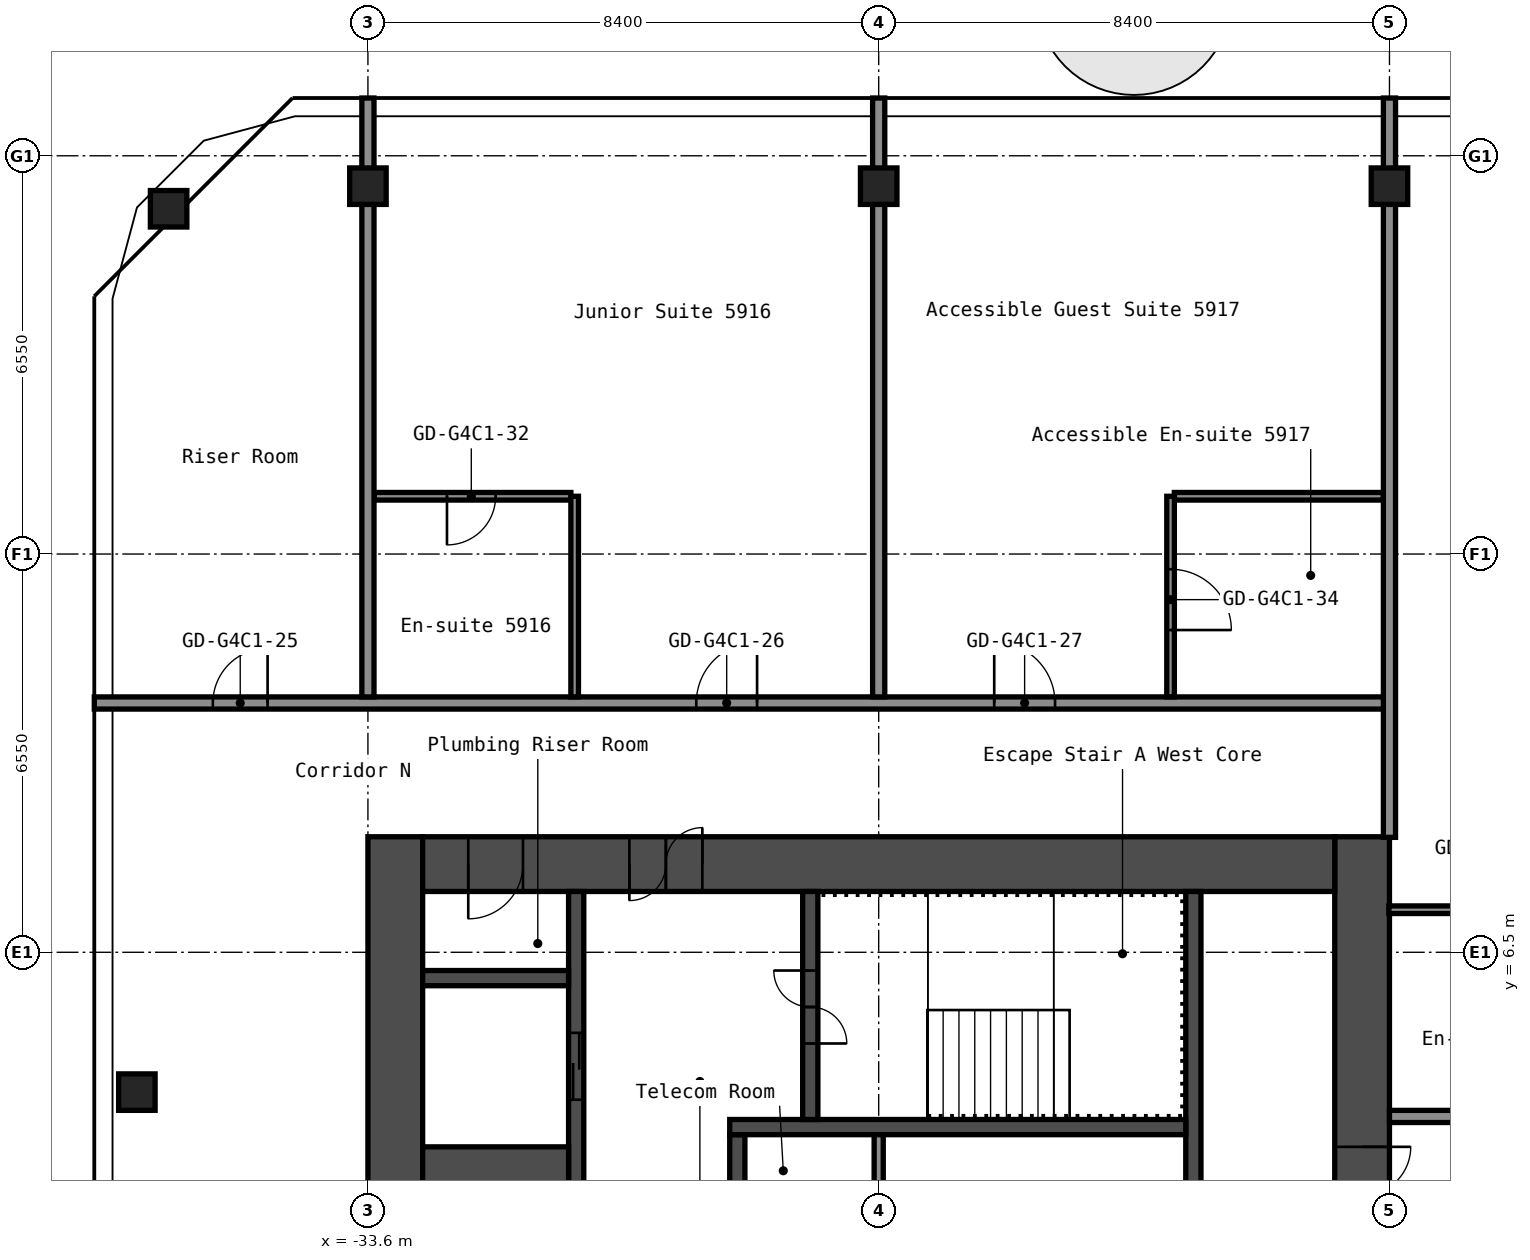
"""IFC4 building model, lengths in metres.
Left out: names, types, materials, properties, quantities, classifications, styles, units other than length and angle.
Written with IfcOpenShell. Run it as: python <this file> out.ifc"""

import sys

from ifc_helpers import new_model, si_unit, direction, frame, frame_2d, origin, origin_2d, place, context, subcontext, project, spatial, rectangle, hollow_rectangle, extrude, element, fill, save


model = new_model("IFC4")
c1 = context("Model", 3, precision=1e-05, world=origin(), true_north=direction((0.0, 1.0)))
c2 = subcontext(c1, "Body", "Model", "MODEL_VIEW")
j1 = project(units=[si_unit("LENGTHUNIT", "METRE"), si_unit("PLANEANGLEUNIT", "RADIAN")], contexts=[c1])
p1 = place(None, origin())
s1 = spatial("IfcSite", under=j1, at=p1, CompositionType="ELEMENT")
p2 = place(p1, origin())
s2 = spatial("IfcBuilding", under=s1, at=p2, CompositionType="ELEMENT")
p3 = place(p2, frame((0.0, 0.0, 209.0)))
s3 = spatial("IfcBuildingStorey", under=s2, at=p3, CompositionType="ELEMENT", Elevation=209.0)
for number, where, z_axis, x_axis in (
    (1, (-37.4, 4.2, 0.0), (0.0, 0.0, 1.0), (1.0, 0.0, 0.0)),
    (2, (-36.878, 18.729, 0.0), (0.0, 0.0, 1.0), (1.0, 0.0, 0.0)),
    (3, (-33.6, 19.1, 0.0), (0.0, 0.0, 1.0), (1.0, 0.0, 0.0)),
    (4, (-25.2, 19.1, 0.0), (0.0, 0.0, 1.0), (1.0, 0.0, 0.0)),
    (5, (-16.8, 19.1, 0.0), (0.0, 0.0, 1.0), (1.0, 0.0, 0.0)),
):
    element("IfcColumn", number, at=place(p3, frame(where, z_axis=z_axis, x_axis=x_axis)), inside=s3, PredefinedType="COLUMN", context=c2, shape_type="SweptSolid", body=[
        extrude(hollow_rectangle(XDim=0.6, YDim=0.6, WallThickness=0.025, InnerFilletRadius=0.038, OuterFilletRadius=0.062, at=origin_2d()), origin(), (0.0, 0.0, 1.0), 2.75),
    ])
p4 = place(p3, frame((-17.25, -8.4, 0.0), z_axis=(0.0, 0.0, 1.0), x_axis=(0.0, 1.0, 0.0)))
e6 = element("IfcWall", 6, at=p4, inside=s3, PredefinedType="SHEAR", context=c2, shape_type="SweptSolid", body=[
    extrude(rectangle(XDim=16.8, YDim=0.9, at=frame_2d((8.4, 0.0))), origin(), (0.0, 0.0, 1.0), 2.75),
])
p5 = place(p4, frame((10.1, 0.0, 0.0)))
e7 = element("IfcOpeningElement", 7, at=p5, cuts=e6, PredefinedType="OPENING", context=c2, shape_type="SweptSolid", body=[
    extrude(rectangle(XDim=1.6, YDim=2.1, at=frame_2d((0.8, 1.05))), frame((0.0, 0.46, 0.0), z_axis=(0.0, -1.0, 0.0), x_axis=(1.0, 0.0, 0.0)), (0.0, 0.0, 1.0), 0.92),
])
p6 = place(p3, frame((-33.15, -8.4, 0.0), z_axis=(0.0, 0.0, 1.0), x_axis=(0.0, 1.0, 0.0)))
e8 = element("IfcWall", 8, at=p6, inside=s3, PredefinedType="SHEAR", context=c2, shape_type="SweptSolid", body=[
    extrude(rectangle(XDim=16.8, YDim=0.9, at=frame_2d((8.4, 0.0))), origin(), (0.0, 0.0, 1.0), 2.75),
])
p7 = place(p3, frame((-32.7, 7.95, 0.0), z_axis=(0.0, 0.0, 1.0), x_axis=(1.0, 0.0, 0.0)))
e9 = element("IfcWall", 9, at=p7, inside=s3, PredefinedType="SHEAR", context=c2, shape_type="SweptSolid", body=[
    extrude(rectangle(XDim=15.0, YDim=0.9, at=frame_2d((7.5, 0.0))), origin(), (0.0, 0.0, 1.0), 2.75),
])
p8 = place(p7, frame((3.4, 0.0, 0.0)))
e10 = element("IfcOpeningElement", 10, at=p8, cuts=e9, PredefinedType="OPENING", context=c2, shape_type="SweptSolid", body=[
    extrude(rectangle(XDim=1.2, YDim=2.1, at=frame_2d((0.6, 1.05))), frame((0.0, 0.46, 0.0), z_axis=(0.0, -1.0, 0.0), x_axis=(1.0, 0.0, 0.0)), (0.0, 0.0, 1.0), 0.92),
])
p9 = place(p7, frame((0.75, 0.0, 0.0)))
e11 = element("IfcOpeningElement", 11, at=p9, cuts=e9, PredefinedType="OPENING", context=c2, shape_type="SweptSolid", body=[
    extrude(rectangle(XDim=0.9, YDim=2.1, at=frame_2d((0.45, 1.05))), frame((0.0, 0.46, 0.0), z_axis=(0.0, -1.0, 0.0), x_axis=(1.0, 0.0, 0.0)), (0.0, 0.0, 1.0), 0.92),
])
p10 = place(p3, frame((-20.025, 1.2, 0.0), z_axis=(0.0, 0.0, 1.0), x_axis=(0.0, 1.0, 0.0)))
e12 = element("IfcWall", 12, at=p10, inside=s3, PredefinedType="SHEAR", context=c2, shape_type="SweptSolid", body=[
    extrude(rectangle(XDim=6.3, YDim=0.25, at=frame_2d((3.15, 0.0))), origin(), (0.0, 0.0, 1.0), 2.75),
])
p11 = place(p3, frame((-27.525, 1.45, 0.0), z_axis=(0.0, 0.0, 1.0), x_axis=(0.0, 1.0, 0.0)))
e13 = element("IfcWall", 13, at=p11, inside=s3, PredefinedType="SHEAR", context=c2, shape_type="SweptSolid", body=[
    extrude(rectangle(XDim=2.05, YDim=0.25, at=frame_2d((1.025, 0.0))), origin(), (0.0, 0.0, 1.0), 2.75),
])
p12 = place(p3, frame((-27.65, 3.625, 0.0), z_axis=(0.0, 0.0, 1.0), x_axis=(1.0, 0.0, 0.0)))
e14 = element("IfcWall", 14, at=p12, inside=s3, PredefinedType="SHEAR", context=c2, shape_type="SweptSolid", body=[
    extrude(rectangle(XDim=7.5, YDim=0.25, at=frame_2d((3.75, 0.0))), origin(), (0.0, 0.0, 1.0), 2.75),
])
p13 = place(p3, frame((-26.325, 3.75, 0.0), z_axis=(0.0, 0.0, 1.0), x_axis=(0.0, 1.0, 0.0)))
e15 = element("IfcWall", 15, at=p13, inside=s3, PredefinedType="SHEAR", context=c2, shape_type="SweptSolid", body=[
    extrude(rectangle(XDim=3.75, YDim=0.25, at=frame_2d((1.875, 0.0))), origin(), (0.0, 0.0, 1.0), 2.75),
])
p14 = place(p13, frame((1.25, 0.0, 0.0)))
e16 = element("IfcOpeningElement", 16, at=p14, cuts=e15, PredefinedType="OPENING", context=c2, shape_type="SweptSolid", body=[
    extrude(rectangle(XDim=1.2, YDim=2.1, at=frame_2d((0.6, 1.05))), frame((0.0, 0.135, 0.0), z_axis=(0.0, -1.0, 0.0), x_axis=(1.0, 0.0, 0.0)), (0.0, 0.0, 1.0), 0.27),
])
p15 = place(p3, frame((-30.175, 1.45, 0.0), z_axis=(0.0, 0.0, 1.0), x_axis=(0.0, 1.0, 0.0)))
e17 = element("IfcWall", 17, at=p15, inside=s3, PredefinedType="SHEAR", context=c2, shape_type="SweptSolid", body=[
    extrude(rectangle(XDim=6.05, YDim=0.25, at=frame_2d((3.025, 0.0))), origin(), (0.0, 0.0, 1.0), 2.75),
])
p16 = place(p15, frame((2.625, 0.0, 0.0)))
e18 = element("IfcOpeningElement", 18, at=p16, cuts=e17, PredefinedType="OPENING", context=c2, shape_type="SweptSolid", body=[
    extrude(rectangle(XDim=1.1, YDim=2.1, at=frame_2d((0.55, 1.05))), frame((0.0, 0.135, 0.0), z_axis=(0.0, -1.0, 0.0), x_axis=(1.0, 0.0, 0.0)), (0.0, 0.0, 1.0), 0.27),
])
p17 = place(p3, frame((-32.7, 2.375, 0.0), z_axis=(0.0, 0.0, 1.0), x_axis=(1.0, 0.0, 0.0)))
e19 = element("IfcWall", 19, at=p17, inside=s3, PredefinedType="SHEAR", context=c2, shape_type="SweptSolid", body=[
    extrude(rectangle(XDim=2.4, YDim=1.85, at=frame_2d((1.2, 0.0))), origin(), (0.0, 0.0, 1.0), 2.75),
])
p18 = place(p3, frame((-32.7, 6.075, 0.0), z_axis=(0.0, 0.0, 1.0), x_axis=(1.0, 0.0, 0.0)))
e20 = element("IfcWall", 20, at=p18, inside=s3, PredefinedType="SHEAR", context=c2, shape_type="SweptSolid", body=[
    extrude(rectangle(XDim=2.4, YDim=0.25, at=frame_2d((1.2, 0.0))), origin(), (0.0, 0.0, 1.0), 2.75),
])
p19 = place(p3, frame((-25.2, 1.45, 0.0), z_axis=(0.0, 0.0, 1.0), x_axis=(0.0, 1.0, 0.0)))
e21 = element("IfcWall", 21, at=p19, inside=s3, PredefinedType="PARTITIONING", context=c2, shape_type="SweptSolid", body=[
    extrude(rectangle(XDim=2.05, YDim=0.15, at=frame_2d((1.025, 0.0))), origin(), (0.0, 0.0, 1.0), 2.75),
])
p20 = place(p3, frame((-16.8, 3.8, 0.0), z_axis=(0.0, 0.0, 1.0), x_axis=(1.0, 0.0, 0.0)))
e22 = element("IfcWall", 22, at=p20, inside=s3, PredefinedType="PARTITIONING", context=c2, shape_type="SweptSolid", body=[
    extrude(rectangle(XDim=33.6, YDim=0.2, at=frame_2d((16.8, 0.0))), origin(), (0.0, 0.0, 1.0), 2.75),
])
p21 = place(p20, frame((5.4, 0.0, 0.0)))
e23 = element("IfcOpeningElement", 23, at=p21, cuts=e22, PredefinedType="OPENING", context=c2, shape_type="SweptSolid", body=[
    extrude(rectangle(XDim=1.0, YDim=2.1, at=frame_2d((0.5, 1.05))), frame((0.0, 0.11, 0.0), z_axis=(0.0, -1.0, 0.0), x_axis=(1.0, 0.0, 0.0)), (0.0, 0.0, 1.0), 0.22),
])
p22 = place(p20, frame((11.25, 0.0, 0.0)))
e24 = element("IfcOpeningElement", 24, at=p22, cuts=e22, PredefinedType="OPENING", context=c2, shape_type="SweptSolid", body=[
    extrude(rectangle(XDim=1.0, YDim=2.1, at=frame_2d((0.5, 1.05))), frame((0.0, 0.11, 0.0), z_axis=(0.0, -1.0, 0.0), x_axis=(1.0, 0.0, 0.0)), (0.0, 0.0, 1.0), 0.22),
])
p23 = place(p20, frame((12.95, 0.0, 0.0)))
e25 = element("IfcOpeningElement", 25, at=p23, cuts=e22, PredefinedType="OPENING", context=c2, shape_type="SweptSolid", body=[
    extrude(rectangle(XDim=1.0, YDim=2.1, at=frame_2d((0.5, 1.05))), frame((0.0, 0.11, 0.0), z_axis=(0.0, -1.0, 0.0), x_axis=(1.0, 0.0, 0.0)), (0.0, 0.0, 1.0), 0.22),
])
p24 = place(p20, frame((18.87, 0.0, 0.0)))
e26 = element("IfcOpeningElement", 26, at=p24, cuts=e22, PredefinedType="OPENING", context=c2, shape_type="SweptSolid", body=[
    extrude(rectangle(XDim=0.9, YDim=2.1, at=frame_2d((0.45, 1.05))), frame((0.0, 0.11, 0.0), z_axis=(0.0, -1.0, 0.0), x_axis=(1.0, 0.0, 0.0)), (0.0, 0.0, 1.0), 0.22),
])
p25 = place(p20, frame((23.07, 0.0, 0.0)))
e27 = element("IfcOpeningElement", 27, at=p25, cuts=e22, PredefinedType="OPENING", context=c2, shape_type="SweptSolid", body=[
    extrude(rectangle(XDim=0.9, YDim=2.1, at=frame_2d((0.45, 1.05))), frame((0.0, 0.11, 0.0), z_axis=(0.0, -1.0, 0.0), x_axis=(1.0, 0.0, 0.0)), (0.0, 0.0, 1.0), 0.22),
])
p26 = place(p20, frame((28.05, 0.0, 0.0)))
e28 = element("IfcOpeningElement", 28, at=p26, cuts=e22, PredefinedType="OPENING", context=c2, shape_type="SweptSolid", body=[
    extrude(rectangle(XDim=1.0, YDim=2.1, at=frame_2d((0.5, 1.05))), frame((0.0, 0.11, 0.0), z_axis=(0.0, -1.0, 0.0), x_axis=(1.0, 0.0, 0.0)), (0.0, 0.0, 1.0), 0.22),
])
p27 = place(p20, frame((29.75, 0.0, 0.0)))
e29 = element("IfcOpeningElement", 29, at=p27, cuts=e22, PredefinedType="OPENING", context=c2, shape_type="SweptSolid", body=[
    extrude(rectangle(XDim=1.0, YDim=2.1, at=frame_2d((0.5, 1.05))), frame((0.0, 0.11, 0.0), z_axis=(0.0, -1.0, 0.0), x_axis=(1.0, 0.0, 0.0)), (0.0, 0.0, 1.0), 0.22),
])
p28 = place(p3, frame((-16.81, 7.2, 0.0), z_axis=(0.0, 0.0, 1.0), x_axis=(1.0, 0.0, 0.0)))
e30 = element("IfcWall", 30, at=p28, inside=s3, PredefinedType="PARTITIONING", context=c2, shape_type="SweptSolid", body=[
    extrude(rectangle(XDim=3.348, YDim=0.125, at=frame_2d((1.674, 0.0))), origin(), (0.0, 0.0, 1.0), 2.75),
])
p29 = place(p28, frame((1.31, 0.0, 0.0)))
e31 = element("IfcOpeningElement", 31, at=p29, cuts=e30, PredefinedType="OPENING", context=c2, shape_type="SweptSolid", body=[
    extrude(rectangle(XDim=0.8, YDim=2.1, at=frame_2d((0.4, 1.05))), frame((0.0, 0.073, 0.0), z_axis=(0.0, -1.0, 0.0), x_axis=(1.0, 0.0, 0.0)), (0.0, 0.0, 1.0), 0.145),
])
p30 = place(p3, frame((-38.1, 10.6, 0.0), z_axis=(0.0, 0.0, 1.0), x_axis=(1.0, 0.0, 0.0)))
e32 = element("IfcWall", 32, at=p30, inside=s3, PredefinedType="PARTITIONING", context=c2, shape_type="SweptSolid", body=[
    extrude(rectangle(XDim=21.3, YDim=0.2, at=frame_2d((10.65, 0.0))), origin(), (0.0, 0.0, 1.0), 2.75),
])
p31 = place(p30, frame((1.95, 0.0, 0.0)))
e33 = element("IfcOpeningElement", 33, at=p31, cuts=e32, PredefinedType="OPENING", context=c2, shape_type="SweptSolid", body=[
    extrude(rectangle(XDim=0.9, YDim=2.1, at=frame_2d((0.45, 1.05))), frame((0.0, 0.11, 0.0), z_axis=(0.0, -1.0, 0.0), x_axis=(1.0, 0.0, 0.0)), (0.0, 0.0, 1.0), 0.22),
])
p32 = place(p30, frame((9.9, 0.0, 0.0)))
e34 = element("IfcOpeningElement", 34, at=p32, cuts=e32, PredefinedType="OPENING", context=c2, shape_type="SweptSolid", body=[
    extrude(rectangle(XDim=1.0, YDim=2.1, at=frame_2d((0.5, 1.05))), frame((0.0, 0.11, 0.0), z_axis=(0.0, -1.0, 0.0), x_axis=(1.0, 0.0, 0.0)), (0.0, 0.0, 1.0), 0.22),
])
p33 = place(p30, frame((14.8, 0.0, 0.0)))
e35 = element("IfcOpeningElement", 35, at=p33, cuts=e32, PredefinedType="OPENING", context=c2, shape_type="SweptSolid", body=[
    extrude(rectangle(XDim=1.0, YDim=2.1, at=frame_2d((0.5, 1.05))), frame((0.0, 0.11, 0.0), z_axis=(0.0, -1.0, 0.0), x_axis=(1.0, 0.0, 0.0)), (0.0, 0.0, 1.0), 0.22),
])
p34 = place(p3, frame((-33.5, 14.0, 0.0), z_axis=(0.0, 0.0, 1.0), x_axis=(1.0, 0.0, 0.0)))
e36 = element("IfcWall", 36, at=p34, inside=s3, PredefinedType="PARTITIONING", context=c2, shape_type="SweptSolid", body=[
    extrude(rectangle(XDim=3.238, YDim=0.125, at=frame_2d((1.619, 0.0))), origin(), (0.0, 0.0, 1.0), 2.75),
])
p35 = place(p34, frame((1.2, 0.0, 0.0)))
e37 = element("IfcOpeningElement", 37, at=p35, cuts=e36, PredefinedType="OPENING", context=c2, shape_type="SweptSolid", body=[
    extrude(rectangle(XDim=0.8, YDim=2.1, at=frame_2d((0.4, 1.05))), frame((0.0, 0.073, 0.0), z_axis=(0.0, -1.0, 0.0), x_axis=(1.0, 0.0, 0.0)), (0.0, 0.0, 1.0), 0.145),
])
p36 = place(p3, frame((-20.337, 14.0, 0.0), z_axis=(0.0, 0.0, 1.0), x_axis=(1.0, 0.0, 0.0)))
e38 = element("IfcWall", 38, at=p36, inside=s3, PredefinedType="PARTITIONING", context=c2, shape_type="SweptSolid", body=[
    extrude(rectangle(XDim=3.438, YDim=0.125, at=frame_2d((1.719, 0.0))), origin(), (0.0, 0.0, 1.0), 2.75),
])
p37 = place(p3, frame((-33.6, 10.7, 0.0), z_axis=(0.0, 0.0, 1.0), x_axis=(0.0, 1.0, 0.0)))
e39 = element("IfcWall", 39, at=p37, inside=s3, PredefinedType="PARTITIONING", context=c2, shape_type="SweptSolid", body=[
    extrude(rectangle(XDim=9.85, YDim=0.2, at=frame_2d((4.925, 0.0))), origin(), (0.0, 0.0, 1.0), 2.75),
])
p38 = place(p3, frame((-30.2, 10.7, 0.0), z_axis=(0.0, 0.0, 1.0), x_axis=(0.0, 1.0, 0.0)))
e40 = element("IfcWall", 40, at=p38, inside=s3, PredefinedType="PARTITIONING", context=c2, shape_type="SweptSolid", body=[
    extrude(rectangle(XDim=3.3, YDim=0.125, at=frame_2d((1.65, 0.0))), origin(), (0.0, 0.0, 1.0), 2.75),
])
p39 = place(p3, frame((-25.2, 10.7, 0.0), z_axis=(0.0, 0.0, 1.0), x_axis=(0.0, 1.0, 0.0)))
e41 = element("IfcWall", 41, at=p39, inside=s3, PredefinedType="PARTITIONING", context=c2, shape_type="SweptSolid", body=[
    extrude(rectangle(XDim=9.85, YDim=0.2, at=frame_2d((4.925, 0.0))), origin(), (0.0, 0.0, 1.0), 2.75),
])
p40 = place(p3, frame((-20.4, 10.7, 0.0), z_axis=(0.0, 0.0, 1.0), x_axis=(0.0, 1.0, 0.0)))
e42 = element("IfcWall", 42, at=p40, inside=s3, PredefinedType="PARTITIONING", context=c2, shape_type="SweptSolid", body=[
    extrude(rectangle(XDim=3.3, YDim=0.125, at=frame_2d((1.65, 0.0))), origin(), (0.0, 0.0, 1.0), 2.75),
])
p41 = place(p40, frame((1.1, 0.0, 0.0)))
e43 = element("IfcOpeningElement", 43, at=p41, cuts=e42, PredefinedType="OPENING", context=c2, shape_type="SweptSolid", body=[
    extrude(rectangle(XDim=1.0, YDim=2.1, at=frame_2d((0.5, 1.05))), frame((0.0, 0.073, 0.0), z_axis=(0.0, -1.0, 0.0), x_axis=(1.0, 0.0, 0.0)), (0.0, 0.0, 1.0), 0.145),
])
p42 = place(p3, frame((-16.8, 8.39, 0.0), z_axis=(0.0, 0.0, 1.0), x_axis=(0.0, 1.0, 0.0)))
e44 = element("IfcWall", 44, at=p42, inside=s3, PredefinedType="PARTITIONING", context=c2, shape_type="SweptSolid", body=[
    extrude(rectangle(XDim=12.16, YDim=0.2, at=frame_2d((6.08, 0.0))), origin(), (0.0, 0.0, 1.0), 2.75),
])
p43 = place(p5, origin())
e45 = element("IfcDoor", 45, at=p43, inside=s3, OperationType="DOUBLE_DOOR_SINGLE_SWING", PredefinedType="DOOR", context=c2, shape_type="SweptSolid", body=[
    extrude(rectangle(XDim=1.6, YDim=2.1, at=frame_2d((0.8, 1.05))), frame((0.0, 0.025, 0.0), z_axis=(0.0, -1.0, 0.0), x_axis=(1.0, 0.0, 0.0)), (0.0, 0.0, 1.0), 0.05),
])
fill(e7, e45)
p44 = place(p8, origin())
e46 = element("IfcDoor", 46, at=p44, inside=s3, OperationType="DOUBLE_DOOR_SINGLE_SWING", PredefinedType="DOOR", context=c2, shape_type="SweptSolid", body=[
    extrude(rectangle(XDim=1.2, YDim=2.1, at=frame_2d((0.6, 1.05))), frame((0.0, 0.025, 0.0), z_axis=(0.0, -1.0, 0.0), x_axis=(1.0, 0.0, 0.0)), (0.0, 0.0, 1.0), 0.05),
])
fill(e10, e46)
p45 = place(p9, origin())
e47 = element("IfcDoor", 47, at=p45, inside=s3, OperationType="SINGLE_SWING_LEFT", PredefinedType="DOOR", context=c2, shape_type="SweptSolid", body=[
    extrude(rectangle(XDim=0.9, YDim=2.1, at=frame_2d((0.45, 1.05))), frame((0.0, 0.025, 0.0), z_axis=(0.0, -1.0, 0.0), x_axis=(1.0, 0.0, 0.0)), (0.0, 0.0, 1.0), 0.05),
])
fill(e11, e47)
p46 = place(p14, origin())
e48 = element("IfcDoor", 48, at=p46, inside=s3, OperationType="DOUBLE_DOOR_SINGLE_SWING", PredefinedType="DOOR", context=c2, shape_type="SweptSolid", body=[
    extrude(rectangle(XDim=1.2, YDim=2.1, at=frame_2d((0.6, 1.05))), frame((0.0, 0.025, 0.0), z_axis=(0.0, -1.0, 0.0), x_axis=(1.0, 0.0, 0.0)), (0.0, 0.0, 1.0), 0.05),
])
fill(e16, e48)
p47 = place(p16, origin())
e49 = element("IfcDoor", 49, at=p47, inside=s3, OperationType="DOUBLE_DOOR_SLIDING", PredefinedType="DOOR", context=c2, shape_type="SweptSolid", body=[
    extrude(rectangle(XDim=1.1, YDim=2.1, at=frame_2d((0.55, 1.05))), frame((0.0, 0.025, 0.0), z_axis=(0.0, -1.0, 0.0), x_axis=(1.0, 0.0, 0.0)), (0.0, 0.0, 1.0), 0.05),
])
fill(e18, e49)
p48 = place(p31, origin())
e50 = element("IfcDoor", 50, at=p48, inside=s3, OperationType="SINGLE_SWING_LEFT", PredefinedType="DOOR", context=c2, shape_type="SweptSolid", body=[
    extrude(rectangle(XDim=0.9, YDim=2.1, at=frame_2d((0.45, 1.05))), frame((0.0, 0.025, 0.0), z_axis=(0.0, -1.0, 0.0), x_axis=(1.0, 0.0, 0.0)), (0.0, 0.0, 1.0), 0.05),
])
fill(e33, e50)
p49 = place(p32, origin())
e51 = element("IfcDoor", 51, at=p49, inside=s3, OperationType="SINGLE_SWING_LEFT", PredefinedType="DOOR", context=c2, shape_type="SweptSolid", body=[
    extrude(rectangle(XDim=1.0, YDim=2.1, at=frame_2d((0.5, 1.05))), frame((0.0, 0.025, 0.0), z_axis=(0.0, -1.0, 0.0), x_axis=(1.0, 0.0, 0.0)), (0.0, 0.0, 1.0), 0.05),
])
fill(e34, e51)
p50 = place(p33, origin())
e52 = element("IfcDoor", 52, at=p50, inside=s3, OperationType="SINGLE_SWING_RIGHT", PredefinedType="DOOR", context=c2, shape_type="SweptSolid", body=[
    extrude(rectangle(XDim=1.0, YDim=2.1, at=frame_2d((0.5, 1.05))), frame((0.0, 0.025, 0.0), z_axis=(0.0, -1.0, 0.0), x_axis=(1.0, 0.0, 0.0)), (0.0, 0.0, 1.0), 0.05),
])
fill(e35, e52)
p51 = place(p35, origin())
e53 = element("IfcDoor", 53, at=p51, inside=s3, OperationType="SINGLE_SWING_LEFT", PredefinedType="DOOR", context=c2, shape_type="SweptSolid", body=[
    extrude(rectangle(XDim=0.8, YDim=2.1, at=frame_2d((0.4, 1.05))), frame((0.0, 0.025, 0.0), z_axis=(0.0, -1.0, 0.0), x_axis=(1.0, 0.0, 0.0)), (0.0, 0.0, 1.0), 0.05),
])
fill(e37, e53)
p52 = place(p41, origin())
e54 = element("IfcDoor", 54, at=p52, inside=s3, OperationType="SINGLE_SWING_LEFT", PredefinedType="DOOR", context=c2, shape_type="SweptSolid", body=[
    extrude(rectangle(XDim=1.0, YDim=2.1, at=frame_2d((0.5, 1.05))), frame((0.0, 0.025, 0.0), z_axis=(0.0, -1.0, 0.0), x_axis=(1.0, 0.0, 0.0)), (0.0, 0.0, 1.0), 0.05),
])
fill(e43, e54)
save(model, sys.argv[1])
